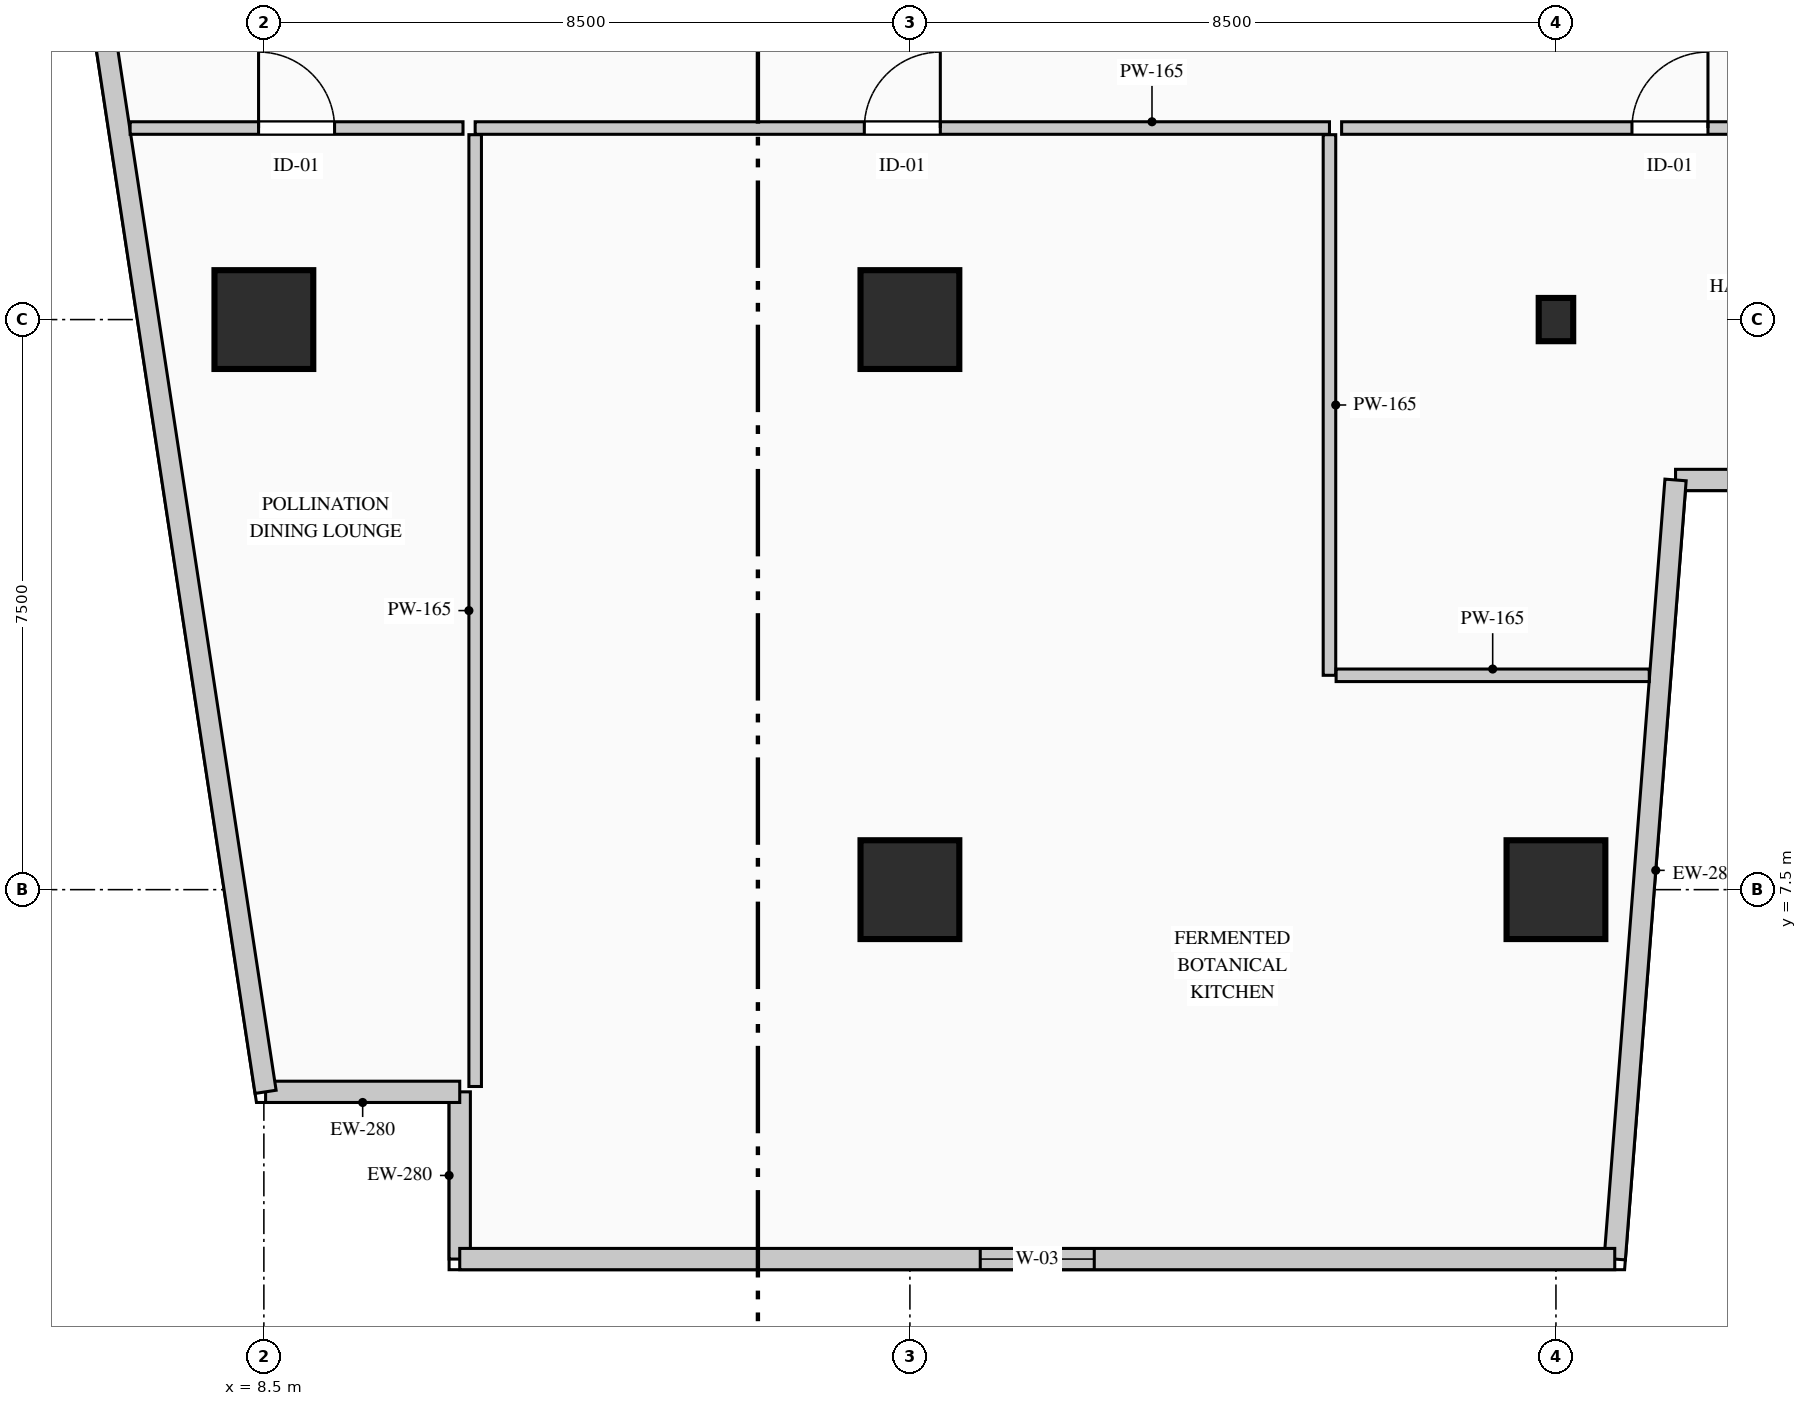
"""IFC4 building model, lengths in metres.
Left out: names, types, materials, properties, quantities, classifications, styles, units other than length and angle.
Written with IfcOpenShell. Run it as: python <this file> out.ifc"""

import sys

from ifc_helpers import new_model, si_unit, direction, frame, frame_2d, origin, origin_2d, place, context, subcontext, project, spatial, rectangle, i_section, extrude, element, fill, save


model = new_model("IFC4")
c1 = context("Model", 3, precision=1e-05, world=origin(), true_north=direction((0.0, 1.0)))
c2 = subcontext(c1, "Body", "Model", "MODEL_VIEW")
j1 = project(units=[si_unit("LENGTHUNIT", "METRE"), si_unit("PLANEANGLEUNIT", "RADIAN")], contexts=[c1])
p1 = place(None, origin())
s1 = spatial("IfcSite", under=j1, at=p1, CompositionType="ELEMENT")
p2 = place(p1, origin())
s2 = spatial("IfcBuilding", under=s1, at=p2, CompositionType="ELEMENT")
p3 = place(p2, frame((0.0, 0.0, 53.4)))
s3 = spatial("IfcBuildingStorey", under=s2, at=p3, CompositionType="ELEMENT", Elevation=53.4)
for number, where, z_axis, x_axis in (
    (1, (8.5, 15.0, 0.0), (0.0, 0.0, 1.0), (1.0, 0.0, 0.0)),
    (2, (17.0, 7.5, 0.0), (0.0, 0.0, 1.0), (1.0, 0.0, 0.0)),
    (3, (17.0, 15.0, 0.0), (0.0, 0.0, 1.0), (1.0, 0.0, 0.0)),
    (4, (25.5, 7.5, 0.0), (0.0, 0.0, 1.0), (1.0, 0.0, 0.0)),
):
    element("IfcColumn", number, at=place(p3, frame(where, z_axis=z_axis, x_axis=x_axis)), inside=s3, PredefinedType="COLUMN", context=c2, shape_type="SweptSolid", body=[
        extrude(rectangle(XDim=1.3, YDim=1.3, at=origin_2d()), origin(), (0.0, 0.0, 1.0), 4.4),
    ])
p4 = place(p3, frame((25.5, 15.0, 0.0), z_axis=(0.0, 0.0, 1.0), x_axis=(1.0, 0.0, 0.0)))
e5 = element("IfcColumn", 5, at=p4, inside=s3, PredefinedType="COLUMN", context=c2, shape_type="SweptSolid", body=[
    extrude(i_section(OverallWidth=0.454, OverallDepth=0.569, WebThickness=0.078, FlangeThickness=0.08, FilletRadius=0.015, at=origin_2d()), origin(), (0.0, 0.0, 1.0), 4.4),
])
p5 = place(p3, frame((11.077, 2.64, 0.0), z_axis=(0.0, 0.0, 1.0), x_axis=(0.0, 1.0, 0.0)))
e6 = element("IfcWall", 6, at=p5, inside=s3, PredefinedType="STANDARD", context=c2, shape_type="SweptSolid", body=[
    extrude(rectangle(XDim=2.2, YDim=0.28, at=frame_2d((1.1, 0.0))), origin(), (0.0, 0.0, 1.0), 4.1),
])
p6 = place(p3, frame((11.077, 4.84, 0.0), z_axis=(0.0, 0.0, 1.0), x_axis=(-1.0, 0.0, 0.0)))
e7 = element("IfcWall", 7, at=p6, inside=s3, PredefinedType="STANDARD", context=c2, shape_type="SweptSolid", body=[
    extrude(rectangle(XDim=2.554, YDim=0.28, at=frame_2d((1.277, 0.0))), origin(), (0.0, 0.0, 1.0), 4.1),
])
p7 = place(p3, frame((8.523, 4.84, 0.0), z_axis=(0.0, 0.0, 1.0), x_axis=(-0.150394554312, 0.988626055712, 0.0)))
e8 = element("IfcWall", 8, at=p7, inside=s3, PredefinedType="STANDARD", context=c2, shape_type="SweptSolid", body=[
    extrude(rectangle(XDim=36.738, YDim=0.28, at=frame_2d((18.369, 0.0))), origin(), (0.0, 0.0, 1.0), 4.1),
])
p8 = place(p7, frame((22.762, 0.0, 0.9)))
e9 = element("IfcOpeningElement", 9, at=p8, cuts=e8, PredefinedType="OPENING", context=c2, shape_type="SweptSolid", body=[
    extrude(rectangle(XDim=1.5, YDim=1.8, at=frame_2d((0.75, 0.9))), frame((0.0, 0.15, 0.0), z_axis=(0.0, -1.0, 0.0), x_axis=(1.0, 0.0, 0.0)), (0.0, 0.0, 1.0), 0.3),
])
p9 = place(p3, frame((35.77, 12.89, 0.0), z_axis=(0.0, 0.0, 1.0), x_axis=(-1.0, 0.0, 0.0)))
e10 = element("IfcWall", 10, at=p9, inside=s3, PredefinedType="STANDARD", context=c2, shape_type="SweptSolid", body=[
    extrude(rectangle(XDim=8.697, YDim=0.28, at=frame_2d((4.348, 0.0))), origin(), (0.0, 0.0, 1.0), 4.1),
])
p10 = place(p9, frame((5.511, 0.0, 0.9)))
e11 = element("IfcOpeningElement", 11, at=p10, cuts=e10, PredefinedType="OPENING", context=c2, shape_type="SweptSolid", body=[
    extrude(rectangle(XDim=1.5, YDim=1.8, at=frame_2d((0.75, 0.9))), frame((0.0, 0.15, 0.0), z_axis=(0.0, -1.0, 0.0), x_axis=(1.0, 0.0, 0.0)), (0.0, 0.0, 1.0), 0.3),
])
p11 = place(p3, frame((27.073, 12.89, 0.0), z_axis=(0.0, 0.0, 1.0), x_axis=(-0.077816860153, -0.996967670627, 0.0)))
e12 = element("IfcWall", 12, at=p11, inside=s3, PredefinedType="STANDARD", context=c2, shape_type="SweptSolid", body=[
    extrude(rectangle(XDim=10.281, YDim=0.28, at=frame_2d((5.141, 0.0))), origin(), (0.0, 0.0, 1.0), 4.1),
])
p12 = place(p3, frame((26.273, 2.64, 0.0), z_axis=(0.0, 0.0, 1.0), x_axis=(-1.0, 0.0, 0.0)))
e13 = element("IfcWall", 13, at=p12, inside=s3, PredefinedType="STANDARD", context=c2, shape_type="SweptSolid", body=[
    extrude(rectangle(XDim=15.197, YDim=0.28, at=frame_2d((7.598, 0.0))), origin(), (0.0, 0.0, 1.0), 4.1),
])
p13 = place(p12, frame((6.848, 0.0, 0.9)))
e14 = element("IfcOpeningElement", 14, at=p13, cuts=e13, PredefinedType="OPENING", context=c2, shape_type="SweptSolid", body=[
    extrude(rectangle(XDim=1.5, YDim=1.8, at=frame_2d((0.75, 0.9))), frame((0.0, 0.15, 0.0), z_axis=(0.0, -1.0, 0.0), x_axis=(1.0, 0.0, 0.0)), (0.0, 0.0, 1.0), 0.3),
])
p14 = place(p3, frame((11.28, 17.52, 0.0), z_axis=(0.0, 0.0, 1.0), x_axis=(1.0, 0.0, 0.0)))
e15 = element("IfcWall", 15, at=p14, inside=s3, PredefinedType="PARTITIONING", context=c2, shape_type="SweptSolid", body=[
    extrude(rectangle(XDim=11.24, YDim=0.165, at=frame_2d((5.62, 0.0))), origin(), (0.0, 0.0, 1.0), 4.1),
])
p15 = place(p14, frame((5.12, 0.0, 0.0)))
e16 = element("IfcOpeningElement", 16, at=p15, cuts=e15, PredefinedType="OPENING", context=c2, shape_type="SweptSolid", body=[
    extrude(rectangle(XDim=1.0, YDim=2.15, at=frame_2d((0.5, 1.075))), frame((0.0, 0.093, 0.0), z_axis=(0.0, -1.0, 0.0), x_axis=(1.0, 0.0, 0.0)), (0.0, 0.0, 1.0), 0.185),
])
p16 = place(p3, frame((22.52, 17.433, 0.0), z_axis=(0.0, 0.0, 1.0), x_axis=(0.0, -1.0, 0.0)))
e17 = element("IfcWall", 17, at=p16, inside=s3, PredefinedType="PARTITIONING", context=c2, shape_type="SweptSolid", body=[
    extrude(rectangle(XDim=7.113, YDim=0.165, at=frame_2d((3.556, 0.0))), origin(), (0.0, 0.0, 1.0), 3.685),
])
p17 = place(p3, frame((22.607, 10.32, 0.0), z_axis=(0.0, 0.0, 1.0), x_axis=(1.0, 0.0, 0.0)))
e18 = element("IfcWall", 18, at=p17, inside=s3, PredefinedType="PARTITIONING", context=c2, shape_type="SweptSolid", body=[
    extrude(rectangle(XDim=4.12, YDim=0.165, at=frame_2d((2.06, 0.0))), origin(), (0.0, 0.0, 1.0), 4.1),
])
p18 = place(p3, frame((11.28, 4.91, 0.0), z_axis=(0.0, 0.0, 1.0), x_axis=(0.0, 1.0, 0.0)))
e19 = element("IfcWall", 19, at=p18, inside=s3, PredefinedType="PARTITIONING", context=c2, shape_type="SweptSolid", body=[
    extrude(rectangle(XDim=12.522, YDim=0.165, at=frame_2d((6.261, 0.0))), origin(), (0.0, 0.0, 1.0), 4.1),
])
p19 = place(p3, frame((6.74, 17.52, 0.0), z_axis=(0.0, 0.0, 1.0), x_axis=(1.0, 0.0, 0.0)))
e20 = element("IfcWall", 20, at=p19, inside=s3, PredefinedType="PARTITIONING", context=c2, shape_type="SweptSolid", body=[
    extrude(rectangle(XDim=4.38, YDim=0.165, at=frame_2d((2.19, 0.0))), origin(), (0.0, 0.0, 1.0), 4.1),
])
p20 = place(p19, frame((1.69, 0.0, 0.0)))
e21 = element("IfcOpeningElement", 21, at=p20, cuts=e20, PredefinedType="OPENING", context=c2, shape_type="SweptSolid", body=[
    extrude(rectangle(XDim=1.0, YDim=2.15, at=frame_2d((0.5, 1.075))), frame((0.0, 0.093, 0.0), z_axis=(0.0, -1.0, 0.0), x_axis=(1.0, 0.0, 0.0)), (0.0, 0.0, 1.0), 0.185),
])
p21 = place(p3, frame((22.68, 17.52, 0.0), z_axis=(0.0, 0.0, 1.0), x_axis=(1.0, 0.0, 0.0)))
e22 = element("IfcWall", 22, at=p21, inside=s3, PredefinedType="PARTITIONING", context=c2, shape_type="SweptSolid", body=[
    extrude(rectangle(XDim=8.64, YDim=0.165, at=frame_2d((4.32, 0.0))), origin(), (0.0, 0.0, 1.0), 3.685),
])
p22 = place(p21, frame((3.82, 0.0, 0.0)))
e23 = element("IfcOpeningElement", 23, at=p22, cuts=e22, PredefinedType="OPENING", context=c2, shape_type="SweptSolid", body=[
    extrude(rectangle(XDim=1.0, YDim=2.15, at=frame_2d((0.5, 1.075))), frame((0.0, 0.093, 0.0), z_axis=(0.0, -1.0, 0.0), x_axis=(1.0, 0.0, 0.0)), (0.0, 0.0, 1.0), 0.185),
])
p23 = place(p13, origin())
e24 = element("IfcWindow", 24, at=p23, inside=s3, PartitioningType="SINGLE_PANEL", PredefinedType="WINDOW", context=c2, shape_type="SweptSolid", body=[
    extrude(rectangle(XDim=1.5, YDim=1.8, at=frame_2d((0.75, 0.9))), frame((0.0, 0.03, 0.0), z_axis=(0.0, -1.0, 0.0), x_axis=(1.0, 0.0, 0.0)), (0.0, 0.0, 1.0), 0.06),
])
fill(e14, e24)
p24 = place(p15, origin())
e25 = element("IfcDoor", 25, at=p24, inside=s3, OperationType="SINGLE_SWING_RIGHT", PredefinedType="DOOR", context=c2, shape_type="SweptSolid", body=[
    extrude(rectangle(XDim=1.0, YDim=2.15, at=frame_2d((0.5, 1.075))), frame((0.0, 0.025, 0.0), z_axis=(0.0, -1.0, 0.0), x_axis=(1.0, 0.0, 0.0)), (0.0, 0.0, 1.0), 0.05),
])
fill(e16, e25)
p25 = place(p20, origin())
e26 = element("IfcDoor", 26, at=p25, inside=s3, OperationType="SINGLE_SWING_LEFT", PredefinedType="DOOR", context=c2, shape_type="SweptSolid", body=[
    extrude(rectangle(XDim=1.0, YDim=2.15, at=frame_2d((0.5, 1.075))), frame((0.0, 0.025, 0.0), z_axis=(0.0, -1.0, 0.0), x_axis=(1.0, 0.0, 0.0)), (0.0, 0.0, 1.0), 0.05),
])
fill(e21, e26)
p26 = place(p22, origin())
e27 = element("IfcDoor", 27, at=p26, inside=s3, OperationType="SINGLE_SWING_RIGHT", PredefinedType="DOOR", context=c2, shape_type="SweptSolid", body=[
    extrude(rectangle(XDim=1.0, YDim=2.15, at=frame_2d((0.5, 1.075))), frame((0.0, 0.025, 0.0), z_axis=(0.0, -1.0, 0.0), x_axis=(1.0, 0.0, 0.0)), (0.0, 0.0, 1.0), 0.05),
])
fill(e23, e27)
save(model, sys.argv[1])
